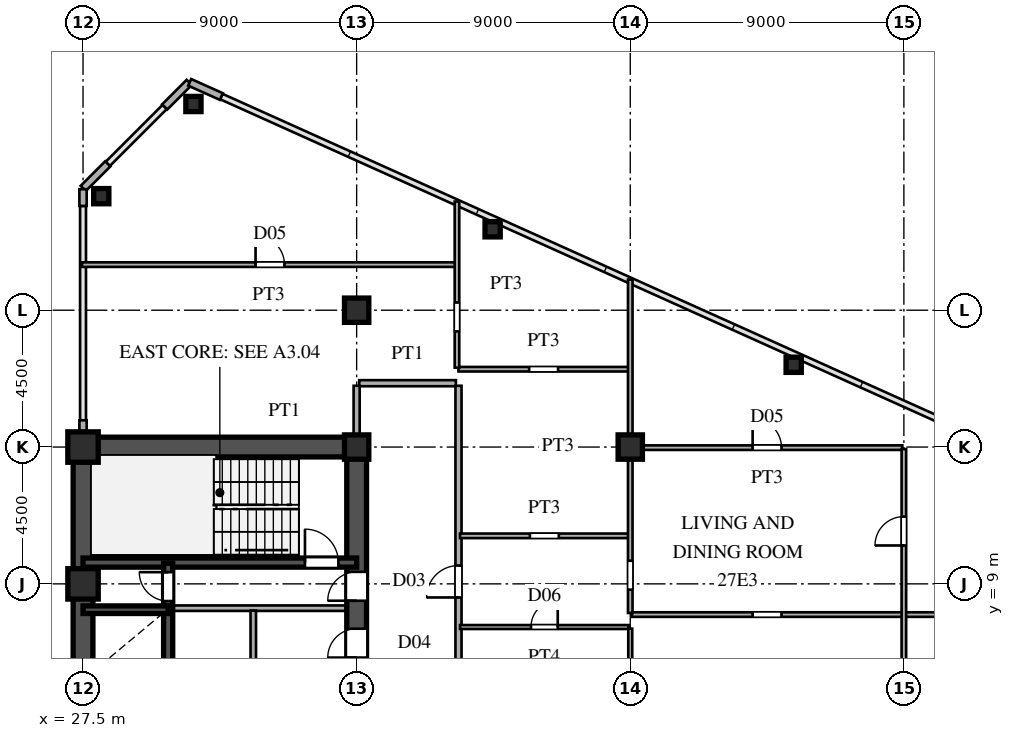
"""IFC4 building model, lengths in metres.
Left out: names, types, materials, properties, quantities, classifications, styles, units other than length and angle.
Written with IfcOpenShell. Run it as: python <this file> out.ifc"""

import sys

from ifc_helpers import new_model, si_unit, direction, frame, frame_2d, origin, origin_2d, place, context, subcontext, project, spatial, rectangle, hollow_rectangle, i_section, extrude, source, transform, mapped, element, fill, save


model = new_model("IFC4")
c1 = context("Model", 3, precision=1e-05, world=origin(), true_north=direction((0.0, 1.0)))
c2 = subcontext(c1, "Body", "Model", "MODEL_VIEW")
j1 = project(units=[si_unit("LENGTHUNIT", "METRE"), si_unit("PLANEANGLEUNIT", "RADIAN")], contexts=[c1])
p1 = place(None, origin())
s1 = spatial("IfcSite", under=j1, at=p1, CompositionType="ELEMENT")
p2 = place(p1, origin())
s2 = spatial("IfcBuilding", under=s1, at=p2, CompositionType="ELEMENT")
p3 = place(p2, frame((0.0, 0.0, 103.2)))
s3 = spatial("IfcBuildingStorey", under=s2, at=p3, CompositionType="ELEMENT", Elevation=103.2)
m1 = source(origin(), c2, "Body", "SweptSolid", [
    extrude(hollow_rectangle(XDim=1.0, YDim=1.0, WallThickness=0.042, at=origin_2d()), origin(), (0.0, 0.0, 1.0), 3.6),
])
for number, where, z_axis, x_axis in (
    (1, (27.5, 9.0, 0.0), (0.0, 0.0, 1.0), (1.0, 0.0, 0.0)),
    (2, (27.5, 13.5, 0.0), (0.0, 0.0, 1.0), (1.0, 0.0, 0.0)),
):
    element("IfcColumn", number, at=place(p3, frame(where, z_axis=z_axis, x_axis=x_axis)), inside=s3, PredefinedType="COLUMN", context=c2, shape_type="MappedRepresentation", body=[
        mapped(m1, transform((0.0, 0.0, 0.0), scale=1.0)),
    ])
m2 = source(origin(), c2, "Body", "SweptSolid", [
    extrude(i_section(OverallWidth=0.8, OverallDepth=0.8, WebThickness=0.032, FlangeThickness=0.05, at=origin_2d()), origin(), (0.0, 0.0, 1.0), 3.6),
])
for number, where, z_axis, x_axis in (
    (3, (36.5, 13.5, 0.0), (0.0, 0.0, 1.0), (1.0, 0.0, 0.0)),
    (4, (36.5, 18.0, 0.0), (0.0, 0.0, 1.0), (1.0, 0.0, 0.0)),
    (5, (45.5, 13.5, 0.0), (0.0, 0.0, 1.0), (1.0, 0.0, 0.0)),
):
    element("IfcColumn", number, at=place(p3, frame(where, z_axis=z_axis, x_axis=x_axis)), inside=s3, PredefinedType="COLUMN", context=c2, shape_type="MappedRepresentation", body=[
        mapped(m2, transform((0.0, 0.0, 0.0), scale=1.0)),
    ])
m3 = source(origin(), c2, "Body", "SweptSolid", [
    extrude(hollow_rectangle(XDim=0.5, YDim=0.5, WallThickness=0.02, at=origin_2d()), origin(), (0.0, 0.0, 1.0), 3.6),
])
for number, where, z_axis, x_axis in (
    (6, (31.131, 24.783, 0.0), (0.0, 0.0, 1.0), (1.0, 0.0, 0.0)),
    (7, (28.1, 21.751, 0.0), (0.0, 0.0, 1.0), (1.0, 0.0, 0.0)),
    (8, (40.973, 20.661, 0.0), (0.0, 0.0, 1.0), (1.0, 0.0, 0.0)),
    (9, (50.875, 16.205, 0.0), (0.0, 0.0, 1.0), (1.0, 0.0, 0.0)),
):
    element("IfcColumn", number, at=place(p3, frame(where, z_axis=z_axis, x_axis=x_axis)), inside=s3, PredefinedType="COLUMN", context=c2, shape_type="MappedRepresentation", body=[
        mapped(m3, transform((0.0, 0.0, 0.0), scale=1.0)),
    ])
p4 = place(p3, frame((32.049, 25.028, 0.0), z_axis=(0.0, 0.0, 1.0), x_axis=(-0.911929519623, 0.410346866979, 0.0)))
e10 = element("IfcWall", 10, at=p4, inside=s3, PredefinedType="SOLIDWALL", context=c2, shape_type="SweptSolid", body=[
    extrude(rectangle(XDim=1.14, YDim=0.24, at=frame_2d((0.57, 0.0))), origin(), (0.0, 0.0, 1.0), 3.38),
])
for number, where, z_axis, x_axis in (
    (11, (30.993, 25.493, 0.0), (0.0, 0.0, 1.0), (-0.707, -0.707, 0.0)),
    (12, (28.313, 22.813, 0.0), (0.0, 0.0, 1.0), (-0.707, -0.707, 0.0)),
):
    element("IfcWall", number, at=place(p3, frame(where, z_axis=z_axis, x_axis=x_axis)), inside=s3, PredefinedType="SOLIDWALL", context=c2, shape_type="SweptSolid", body=[
        extrude(rectangle(XDim=1.14, YDim=0.24, at=frame_2d((0.57, 0.0))), origin(), (0.0, 0.0, 1.0), 3.38),
    ])
p5 = place(p3, frame((27.5, 13.83, 0.0), z_axis=(0.0, 0.0, 1.0), x_axis=(0.0, 1.0, 0.0)))
e13 = element("IfcWall", 13, at=p5, inside=s3, PredefinedType="SOLIDWALL", context=c2, shape_type="SweptSolid", body=[
    extrude(rectangle(XDim=0.55, YDim=0.24, at=frame_2d((0.275, 0.0))), origin(), (0.0, 0.0, 1.0), 2.88),
])
p6 = place(p3, frame((27.5, 21.43, 0.0), z_axis=(0.0, 0.0, 1.0), x_axis=(0.0, 1.0, 0.0)))
e14 = element("IfcWall", 14, at=p6, inside=s3, PredefinedType="SOLIDWALL", context=c2, shape_type="SweptSolid", body=[
    extrude(rectangle(XDim=0.55, YDim=0.24, at=frame_2d((0.275, 0.0))), origin(), (0.0, 0.0, 1.0), 3.38),
])
p7 = place(p3, frame((27.5, 1.3, 0.0), z_axis=(0.0, 0.0, 1.0), x_axis=(0.0, 1.0, 0.0)))
e15 = element("IfcWall", 15, at=p7, inside=s3, PredefinedType="SHEAR", context=c2, shape_type="SweptSolid", body=[
    extrude(rectangle(XDim=12.2, YDim=0.65, at=frame_2d((6.1, 0.0))), origin(), (0.0, 0.0, 1.0), 3.38),
])
p8 = place(p3, frame((27.5, 13.5, 0.0), z_axis=(0.0, 0.0, 1.0), x_axis=(1.0, 0.0, 0.0)))
e16 = element("IfcWall", 16, at=p8, inside=s3, PredefinedType="SHEAR", context=c2, shape_type="SweptSolid", body=[
    extrude(rectangle(XDim=9.0, YDim=0.65, at=frame_2d((4.5, 0.0))), origin(), (0.0, 0.0, 1.0), 3.38),
])
p9 = place(p3, frame((36.5, 8.2, 0.0), z_axis=(0.0, 0.0, 1.0), x_axis=(0.0, 1.0, 0.0)))
e17 = element("IfcWall", 17, at=p9, inside=s3, PredefinedType="SHEAR", context=c2, shape_type="SweptSolid", body=[
    extrude(rectangle(XDim=5.45, YDim=0.65, at=frame_2d((2.725, 0.0))), origin(), (0.0, 0.0, 1.0), 3.38),
])
p10 = place(p9, frame((0.245, 0.0, 0.0)))
e18 = element("IfcOpeningElement", 18, at=p10, cuts=e17, PredefinedType="OPENING", context=c2, shape_type="SweptSolid", body=[
    extrude(rectangle(XDim=0.95, YDim=2.15, at=frame_2d((0.475, 1.075))), frame((0.0, 0.335, 0.0), z_axis=(0.0, -1.0, 0.0), x_axis=(1.0, 0.0, 0.0)), (0.0, 0.0, 1.0), 0.67),
])
p11 = place(p3, frame((36.5, 5.9, 0.0), z_axis=(0.0, 0.0, 1.0), x_axis=(0.0, 1.0, 0.0)))
e19 = element("IfcWall", 19, at=p11, inside=s3, PredefinedType="SHEAR", context=c2, shape_type="SweptSolid", body=[
    extrude(rectangle(XDim=2.3, YDim=0.65, at=frame_2d((1.15, 0.0))), origin(), (0.0, 0.0, 1.0), 3.38),
])
p12 = place(p11, frame((0.675, 0.0, 0.0)))
e20 = element("IfcOpeningElement", 20, at=p12, cuts=e19, PredefinedType="OPENING", context=c2, shape_type="SweptSolid", body=[
    extrude(rectangle(XDim=0.95, YDim=2.15, at=frame_2d((0.475, 1.075))), frame((0.0, 0.335, 0.0), z_axis=(0.0, -1.0, 0.0), x_axis=(1.0, 0.0, 0.0)), (0.0, 0.0, 1.0), 0.67),
])
p13 = place(p3, frame((27.5, 9.7, 0.0), z_axis=(0.0, 0.0, 1.0), x_axis=(1.0, 0.0, 0.0)))
e21 = element("IfcWall", 21, at=p13, inside=s3, PredefinedType="SHEAR", context=c2, shape_type="SweptSolid", body=[
    extrude(rectangle(XDim=9.0, YDim=0.3, at=frame_2d((4.5, 0.0))), origin(), (0.0, 0.0, 1.0), 3.38),
])
p14 = place(p13, frame((7.3, 0.0, 0.0)))
e22 = element("IfcOpeningElement", 22, at=p14, cuts=e21, PredefinedType="OPENING", context=c2, shape_type="SweptSolid", body=[
    extrude(rectangle(XDim=1.1, YDim=2.2, at=frame_2d((0.55, 1.1))), frame((0.0, 0.16, 0.0), z_axis=(0.0, -1.0, 0.0), x_axis=(1.0, 0.0, 0.0)), (0.0, 0.0, 1.0), 0.32),
])
p15 = place(p3, frame((27.5, 8.15, 0.0), z_axis=(0.0, 0.0, 1.0), x_axis=(1.0, 0.0, 0.0)))
e23 = element("IfcWall", 23, at=p15, inside=s3, PredefinedType="SHEAR", context=c2, shape_type="SweptSolid", body=[
    extrude(rectangle(XDim=2.8, YDim=0.25, at=frame_2d((1.4, 0.0))), origin(), (0.0, 0.0, 1.0), 3.38),
])
p16 = place(p3, frame((30.3, 5.9, 0.0), z_axis=(0.0, 0.0, 1.0), x_axis=(0.0, 1.0, 0.0)))
e24 = element("IfcWall", 24, at=p16, inside=s3, PredefinedType="SHEAR", context=c2, shape_type="SweptSolid", body=[
    extrude(rectangle(XDim=2.25, YDim=0.3, at=frame_2d((1.125, 0.0))), origin(), (0.0, 0.0, 1.0), 3.38),
])
p17 = place(p3, frame((30.3, 8.15, 0.0), z_axis=(0.0, 0.0, 1.0), x_axis=(0.0, 1.0, 0.0)))
e25 = element("IfcWall", 25, at=p17, inside=s3, PredefinedType="SHEAR", context=c2, shape_type="SweptSolid", body=[
    extrude(rectangle(XDim=1.53, YDim=0.3, at=frame_2d((0.765, 0.0))), origin(), (0.0, 0.0, 1.0), 3.38),
])
p18 = place(p17, frame((0.285, 0.0, 0.0)))
e26 = element("IfcOpeningElement", 26, at=p18, cuts=e25, PredefinedType="OPENING", context=c2, shape_type="SweptSolid", body=[
    extrude(rectangle(XDim=0.95, YDim=2.15, at=frame_2d((0.475, 1.075))), frame((0.0, 0.16, 0.0), z_axis=(0.0, -1.0, 0.0), x_axis=(1.0, 0.0, 0.0)), (0.0, 0.0, 1.0), 0.32),
])
p19 = place(p3, frame((30.45, 8.2, 0.0), z_axis=(0.0, 0.0, 1.0), x_axis=(1.0, 0.0, 0.0)))
e27 = element("IfcWall", 27, at=p19, inside=s3, PredefinedType="PARTITIONING", context=c2, shape_type="SweptSolid", body=[
    extrude(rectangle(XDim=5.7, YDim=0.18, at=frame_2d((2.85, 0.0))), origin(), (0.0, 0.0, 1.0), 3.38),
])
p20 = place(p3, frame((33.1, 1.38, 0.0), z_axis=(0.0, 0.0, 1.0), x_axis=(0.0, 1.0, 0.0)))
e28 = element("IfcWall", 28, at=p20, inside=s3, PredefinedType="PARTITIONING", context=c2, shape_type="SweptSolid", body=[
    extrude(rectangle(XDim=6.74, YDim=0.18, at=frame_2d((3.37, 0.0))), origin(), (0.0, 0.0, 1.0), 3.38),
])
p21 = place(p3, frame((39.9, 7.58, 0.0), z_axis=(0.0, 0.0, 1.0), x_axis=(1.0, 0.0, 0.0)))
e29 = element("IfcWall", 29, at=p21, inside=s3, PredefinedType="PARTITIONING", context=c2, shape_type="SweptSolid", body=[
    extrude(rectangle(XDim=5.55, YDim=0.13, at=frame_2d((2.775, 0.0))), origin(), (0.0, 0.0, 1.0), 3.38),
])
p22 = place(p21, frame((2.335, 0.0, 0.0)))
e30 = element("IfcOpeningElement", 30, at=p22, cuts=e29, PredefinedType="OPENING", context=c2, shape_type="SweptSolid", body=[
    extrude(rectangle(XDim=0.88, YDim=2.1, at=frame_2d((0.44, 1.05))), frame((0.0, 0.075, 0.0), z_axis=(0.0, -1.0, 0.0), x_axis=(1.0, 0.0, 0.0)), (0.0, 0.0, 1.0), 0.15),
])
p23 = place(p3, frame((45.55, 7.99, 0.0), z_axis=(0.0, 0.0, 1.0), x_axis=(1.0, 0.0, 0.0)))
e31 = element("IfcWall", 31, at=p23, inside=s3, PredefinedType="PARTITIONING", context=c2, shape_type="SweptSolid", body=[
    extrude(rectangle(XDim=24.392, YDim=0.15, at=frame_2d((12.196, 0.0))), origin(), (0.0, 0.0, 1.0), 3.38),
])
p24 = place(p23, frame((3.975, 0.0, 0.0)))
e32 = element("IfcOpeningElement", 32, at=p24, cuts=e31, PredefinedType="OPENING", context=c2, shape_type="SweptSolid", body=[
    extrude(rectangle(XDim=0.95, YDim=2.15, at=frame_2d((0.475, 1.075))), frame((0.0, 0.085, 0.0), z_axis=(0.0, -1.0, 0.0), x_axis=(1.0, 0.0, 0.0)), (0.0, 0.0, 1.0), 0.17),
])
p25 = place(p3, frame((39.9, 10.58, 0.0), z_axis=(0.0, 0.0, 1.0), x_axis=(1.0, 0.0, 0.0)))
e33 = element("IfcWall", 33, at=p25, inside=s3, PredefinedType="PARTITIONING", context=c2, shape_type="SweptSolid", body=[
    extrude(rectangle(XDim=5.55, YDim=0.15, at=frame_2d((2.775, 0.0))), origin(), (0.0, 0.0, 1.0), 3.38),
])
p26 = place(p25, frame((2.3, 0.0, 0.0)))
e34 = element("IfcOpeningElement", 34, at=p26, cuts=e33, PredefinedType="OPENING", context=c2, shape_type="SweptSolid", body=[
    extrude(rectangle(XDim=0.95, YDim=2.15, at=frame_2d((0.475, 1.075))), frame((0.0, 0.085, 0.0), z_axis=(0.0, -1.0, 0.0), x_axis=(1.0, 0.0, 0.0)), (0.0, 0.0, 1.0), 0.17),
])
p27 = place(p3, frame((45.55, 13.48, 0.0), z_axis=(0.0, 0.0, 1.0), x_axis=(1.0, 0.0, 0.0)))
e35 = element("IfcWall", 35, at=p27, inside=s3, PredefinedType="PARTITIONING", context=c2, shape_type="SweptSolid", body=[
    extrude(rectangle(XDim=8.9, YDim=0.15, at=frame_2d((4.45, 0.0))), origin(), (0.0, 0.0, 1.0), 3.38),
])
p28 = place(p27, frame((3.975, 0.0, 0.0)))
e36 = element("IfcOpeningElement", 36, at=p28, cuts=e35, PredefinedType="OPENING", context=c2, shape_type="SweptSolid", body=[
    extrude(rectangle(XDim=0.95, YDim=2.15, at=frame_2d((0.475, 1.075))), frame((0.0, 0.085, 0.0), z_axis=(0.0, -1.0, 0.0), x_axis=(1.0, 0.0, 0.0)), (0.0, 0.0, 1.0), 0.17),
])
p29 = place(p3, frame((36.585, 15.6, 0.0), z_axis=(0.0, 0.0, 1.0), x_axis=(1.0, 0.0, 0.0)))
e37 = element("IfcWall", 37, at=p29, inside=s3, PredefinedType="PARTITIONING", context=c2, shape_type="SweptSolid", body=[
    extrude(rectangle(XDim=3.18, YDim=0.2, at=frame_2d((1.59, 0.0))), origin(), (0.0, 0.0, 1.0), 3.38),
])
p30 = place(p3, frame((39.85, 16.06, 0.0), z_axis=(0.0, 0.0, 1.0), x_axis=(1.0, 0.0, 0.0)))
e38 = element("IfcWall", 38, at=p30, inside=s3, PredefinedType="PARTITIONING", context=c2, shape_type="SweptSolid", body=[
    extrude(rectangle(XDim=5.6, YDim=0.15, at=frame_2d((2.8, 0.0))), origin(), (0.0, 0.0, 1.0), 3.38),
])
p31 = place(p30, frame((2.325, 0.0, 0.0)))
e39 = element("IfcOpeningElement", 39, at=p31, cuts=e38, PredefinedType="OPENING", context=c2, shape_type="SweptSolid", body=[
    extrude(rectangle(XDim=0.95, YDim=2.15, at=frame_2d((0.475, 1.075))), frame((0.0, 0.085, 0.0), z_axis=(0.0, -1.0, 0.0), x_axis=(1.0, 0.0, 0.0)), (0.0, 0.0, 1.0), 0.17),
])
p32 = place(p3, frame((27.465, 19.5, 0.0), z_axis=(0.0, 0.0, 1.0), x_axis=(1.0, 0.0, 0.0)))
e40 = element("IfcWall", 40, at=p32, inside=s3, PredefinedType="PARTITIONING", context=c2, shape_type="SweptSolid", body=[
    extrude(rectangle(XDim=12.285, YDim=0.15, at=frame_2d((6.143, 0.0))), origin(), (0.0, 0.0, 1.0), 3.38),
])
p33 = place(p32, frame((5.71, 0.0, 0.0)))
e41 = element("IfcOpeningElement", 41, at=p33, cuts=e40, PredefinedType="OPENING", context=c2, shape_type="SweptSolid", body=[
    extrude(rectangle(XDim=0.95, YDim=2.15, at=frame_2d((0.475, 1.075))), frame((0.0, 0.085, 0.0), z_axis=(0.0, -1.0, 0.0), x_axis=(1.0, 0.0, 0.0)), (0.0, 0.0, 1.0), 0.17),
])
p34 = place(p3, frame((36.5, 13.83, 0.0), z_axis=(0.0, 0.0, 1.0), x_axis=(0.0, 1.0, 0.0)))
e42 = element("IfcWall", 42, at=p34, inside=s3, PredefinedType="PARTITIONING", context=c2, shape_type="SweptSolid", body=[
    extrude(rectangle(XDim=1.685, YDim=0.2, at=frame_2d((0.842, 0.0))), origin(), (0.0, 0.0, 1.0), 2.68),
])
p35 = place(p3, frame((39.8, 16.109, 0.0), z_axis=(0.0, 0.0, 1.0), x_axis=(0.0, 1.0, 0.0)))
e43 = element("IfcWall", 43, at=p35, inside=s3, PredefinedType="PARTITIONING", context=c2, shape_type="SweptSolid", body=[
    extrude(rectangle(XDim=5.466, YDim=0.15, at=frame_2d((2.733, 0.0))), origin(), (0.0, 0.0, 1.0), 3.38),
])
p36 = place(p35, frame((1.195, 0.0, 0.0)))
e44 = element("IfcOpeningElement", 44, at=p36, cuts=e43, PredefinedType="OPENING", context=c2, shape_type="SweptSolid", body=[
    extrude(rectangle(XDim=0.95, YDim=2.15, at=frame_2d((0.475, 1.075))), frame((0.0, 0.085, 0.0), z_axis=(0.0, -1.0, 0.0), x_axis=(1.0, 0.0, 0.0)), (0.0, 0.0, 1.0), 0.17),
])
p37 = place(p3, frame((39.85, -15.515, 0.0), z_axis=(0.0, 0.0, 1.0), x_axis=(0.0, 1.0, 0.0)))
e45 = element("IfcWall", 45, at=p37, inside=s3, PredefinedType="PARTITIONING", context=c2, shape_type="SweptSolid", body=[
    extrude(rectangle(XDim=31.03, YDim=0.2, at=frame_2d((15.515, 0.0))), origin(), (0.0, 0.0, 1.0), 3.38),
])
p38 = place(p37, frame((1.69, 0.0, 0.0)))
e46 = element("IfcOpeningElement", 46, at=p38, cuts=e45, PredefinedType="OPENING", context=c2, shape_type="SweptSolid", body=[
    extrude(rectangle(XDim=1.05, YDim=2.25, at=frame_2d((0.525, 1.125))), frame((0.0, 0.11, 0.0), z_axis=(0.0, -1.0, 0.0), x_axis=(1.0, 0.0, 0.0)), (0.0, 0.0, 1.0), 0.22),
])
p39 = place(p37, frame((10.538, 0.0, 0.0)))
e47 = element("IfcOpeningElement", 47, at=p39, cuts=e45, PredefinedType="OPENING", context=c2, shape_type="SweptSolid", body=[
    extrude(rectangle(XDim=1.05, YDim=2.25, at=frame_2d((0.525, 1.125))), frame((0.0, 0.11, 0.0), z_axis=(0.0, -1.0, 0.0), x_axis=(1.0, 0.0, 0.0)), (0.0, 0.0, 1.0), 0.22),
])
p40 = place(p37, frame((24.067, 0.0, 0.0)))
e48 = element("IfcOpeningElement", 48, at=p40, cuts=e45, PredefinedType="OPENING", context=c2, shape_type="SweptSolid", body=[
    extrude(rectangle(XDim=1.05, YDim=2.25, at=frame_2d((0.525, 1.125))), frame((0.0, 0.11, 0.0), z_axis=(0.0, -1.0, 0.0), x_axis=(1.0, 0.0, 0.0)), (0.0, 0.0, 1.0), 0.22),
])
p41 = place(p3, frame((45.5, -1.498, 0.0), z_axis=(0.0, 0.0, 1.0), x_axis=(0.0, 1.0, 0.0)))
e49 = element("IfcWall", 49, at=p41, inside=s3, PredefinedType="PARTITIONING", context=c2, shape_type="SweptSolid", body=[
    extrude(rectangle(XDim=9.025, YDim=0.13, at=frame_2d((4.513, 0.0))), origin(), (0.0, 0.0, 1.0), 2.68),
])
p42 = place(p3, frame((45.5, 8.042, 0.0), z_axis=(0.0, 0.0, 1.0), x_axis=(0.0, 1.0, 0.0)))
e50 = element("IfcWall", 50, at=p42, inside=s3, PredefinedType="PARTITIONING", context=c2, shape_type="SweptSolid", body=[
    extrude(rectangle(XDim=10.968, YDim=0.15, at=frame_2d((5.484, 0.0))), origin(), (0.0, 0.0, 1.0), 2.68),
])
p43 = place(p42, frame((0.768, 0.0, 0.0)))
e51 = element("IfcOpeningElement", 51, at=p43, cuts=e50, PredefinedType="OPENING", context=c2, shape_type="SweptSolid", body=[
    extrude(rectangle(XDim=0.95, YDim=2.15, at=frame_2d((0.475, 1.075))), frame((0.0, 0.085, 0.0), z_axis=(0.0, -1.0, 0.0), x_axis=(1.0, 0.0, 0.0)), (0.0, 0.0, 1.0), 0.17),
])
p44 = place(p3, frame((54.5, -10.95, 0.0), z_axis=(0.0, 0.0, 1.0), x_axis=(0.0, 1.0, 0.0)))
e52 = element("IfcWall", 52, at=p44, inside=s3, PredefinedType="PARTITIONING", context=c2, shape_type="SweptSolid", body=[
    extrude(rectangle(XDim=24.383, YDim=0.15, at=frame_2d((12.191, 0.0))), origin(), (0.0, 0.0, 1.0), 2.68),
])
p45 = place(p44, frame((6.957, 0.0, 0.0)))
e53 = element("IfcOpeningElement", 53, at=p45, cuts=e52, PredefinedType="OPENING", context=c2, shape_type="SweptSolid", body=[
    extrude(rectangle(XDim=0.95, YDim=2.15, at=frame_2d((0.475, 1.075))), frame((0.0, 0.085, 0.0), z_axis=(0.0, -1.0, 0.0), x_axis=(1.0, 0.0, 0.0)), (0.0, 0.0, 1.0), 0.17),
])
p46 = place(p44, frame((21.212, 0.0, 0.0)))
e54 = element("IfcOpeningElement", 54, at=p46, cuts=e52, PredefinedType="OPENING", context=c2, shape_type="SweptSolid", body=[
    extrude(rectangle(XDim=0.95, YDim=2.15, at=frame_2d((0.475, 1.075))), frame((0.0, 0.085, 0.0), z_axis=(0.0, -1.0, 0.0), x_axis=(1.0, 0.0, 0.0)), (0.0, 0.0, 1.0), 0.17),
])
p47 = place(p44, frame((16.018, 0.0, 0.0)))
e55 = element("IfcOpeningElement", 55, at=p47, cuts=e52, PredefinedType="OPENING", context=c2, shape_type="SweptSolid", body=[
    extrude(rectangle(XDim=0.95, YDim=2.15, at=frame_2d((0.475, 1.075))), frame((0.0, 0.085, 0.0), z_axis=(0.0, -1.0, 0.0), x_axis=(1.0, 0.0, 0.0)), (0.0, 0.0, 1.0), 0.17),
])
m4 = source(origin(), c2, "Body", "SweptSolid", [
    extrude(rectangle(XDim=0.95, YDim=2.15, at=frame_2d((0.475, 1.075))), frame((0.0, 0.025, 0.0), z_axis=(0.0, -1.0, 0.0), x_axis=(1.0, 0.0, 0.0)), (0.0, 0.0, 1.0), 0.05),
])
p48 = place(p10, origin())
e56 = element("IfcDoor", 56, at=p48, inside=s3, OperationType="SINGLE_SWING_LEFT", PredefinedType="DOOR", context=c2, shape_type="MappedRepresentation", body=[
    mapped(m4, transform((0.0, 0.0, 0.0), scale=1.0)),
])
fill(e18, e56)
p49 = place(p12, origin())
e57 = element("IfcDoor", 57, at=p49, inside=s3, OperationType="SINGLE_SWING_LEFT", PredefinedType="DOOR", context=c2, shape_type="MappedRepresentation", body=[
    mapped(m4, transform((0.0, 0.0, 0.0), scale=1.0)),
])
fill(e20, e57)
m5 = source(origin(), c2, "Body", "SweptSolid", [
    extrude(rectangle(XDim=1.1, YDim=2.2, at=frame_2d((0.55, 1.1))), frame((0.0, 0.025, 0.0), z_axis=(0.0, -1.0, 0.0), x_axis=(1.0, 0.0, 0.0)), (0.0, 0.0, 1.0), 0.05),
])
p50 = place(p14, origin())
e58 = element("IfcDoor", 58, at=p50, inside=s3, OperationType="SINGLE_SWING_LEFT", PredefinedType="DOOR", context=c2, shape_type="MappedRepresentation", body=[
    mapped(m5, transform((0.0, 0.0, 0.0), scale=1.0)),
])
fill(e22, e58)
p51 = place(p18, origin())
e59 = element("IfcDoor", 59, at=p51, inside=s3, OperationType="SINGLE_SWING_RIGHT", PredefinedType="DOOR", context=c2, shape_type="MappedRepresentation", body=[
    mapped(m4, transform((0.0, 0.0, 0.0), scale=1.0)),
])
fill(e26, e59)
m6 = source(origin(), c2, "Body", "SweptSolid", [
    extrude(rectangle(XDim=0.88, YDim=2.1, at=frame_2d((0.44, 1.05))), frame((0.0, 0.025, 0.0), z_axis=(0.0, -1.0, 0.0), x_axis=(1.0, 0.0, 0.0)), (0.0, 0.0, 1.0), 0.05),
])
p52 = place(p22, origin())
e60 = element("IfcDoor", 60, at=p52, inside=s3, OperationType="SINGLE_SWING_RIGHT", PredefinedType="DOOR", context=c2, shape_type="MappedRepresentation", body=[
    mapped(m6, transform((0.0, 0.0, 0.0), scale=1.0)),
])
fill(e30, e60)
m7 = source(origin(), c2, "Body", "SweptSolid", [
    extrude(rectangle(XDim=0.95, YDim=2.15, at=frame_2d((0.475, 1.075))), frame((0.0, 0.025, 0.0), z_axis=(0.0, -1.0, 0.0), x_axis=(1.0, 0.0, 0.0)), (0.0, 0.0, 1.0), 0.05),
])
p53 = place(p28, origin())
e61 = element("IfcDoor", 61, at=p53, inside=s3, OperationType="SINGLE_SWING_LEFT", PredefinedType="DOOR", context=c2, shape_type="MappedRepresentation", body=[
    mapped(m7, transform((0.0, 0.0, 0.0), scale=1.0)),
])
fill(e36, e61)
p54 = place(p33, origin())
e62 = element("IfcDoor", 62, at=p54, inside=s3, OperationType="SINGLE_SWING_LEFT", PredefinedType="DOOR", context=c2, shape_type="MappedRepresentation", body=[
    mapped(m7, transform((0.0, 0.0, 0.0), scale=1.0)),
])
fill(e41, e62)
m8 = source(origin(), c2, "Body", "SweptSolid", [
    extrude(rectangle(XDim=1.05, YDim=2.25, at=frame_2d((0.525, 1.125))), frame((0.0, 0.025, 0.0), z_axis=(0.0, -1.0, 0.0), x_axis=(1.0, 0.0, 0.0)), (0.0, 0.0, 1.0), 0.05),
])
p55 = place(p40, origin())
e63 = element("IfcDoor", 63, at=p55, inside=s3, OperationType="SINGLE_SWING_LEFT", PredefinedType="DOOR", context=c2, shape_type="MappedRepresentation", body=[
    mapped(m8, transform((0.0, 0.0, 0.0), scale=1.0)),
])
fill(e48, e63)
p56 = place(p46, origin())
e64 = element("IfcDoor", 64, at=p56, inside=s3, OperationType="SINGLE_SWING_LEFT", PredefinedType="DOOR", context=c2, shape_type="MappedRepresentation", body=[
    mapped(m7, transform((0.0, 0.0, 0.0), scale=1.0)),
])
fill(e54, e64)
save(model, sys.argv[1])
